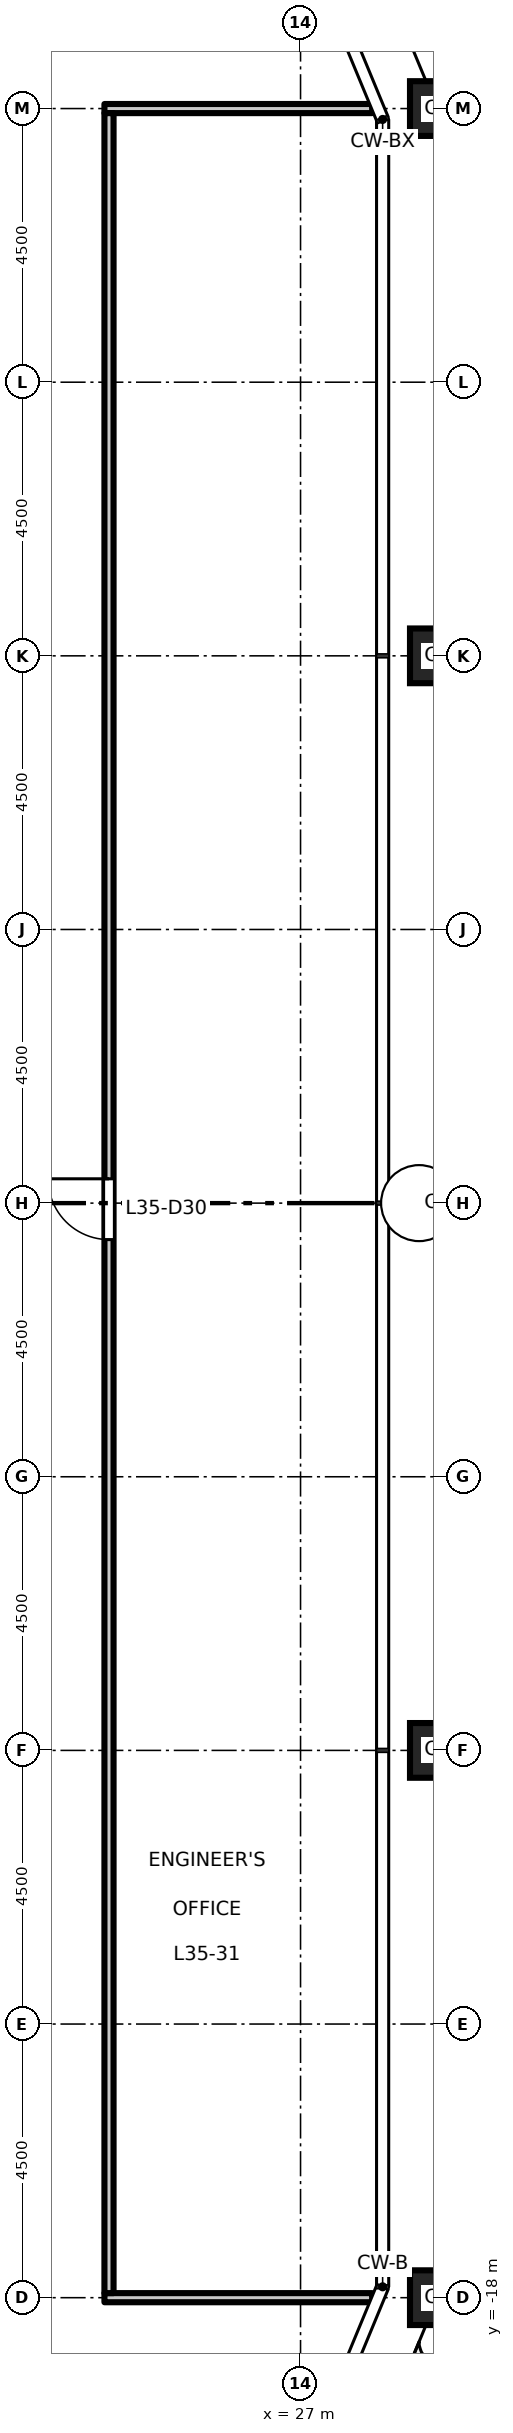
"""IFC4 building model, lengths in metres.
Left out: names, types, materials, properties, quantities, classifications, styles, units other than length and angle.
Written with IfcOpenShell. Run it as: python <this file> out.ifc"""

import sys

from ifc_helpers import new_model, si_unit, direction, frame, frame_2d, origin, origin_2d, place, context, subcontext, project, spatial, rectangle, hollow_rectangle, extrude, element, fill, save


model = new_model("IFC4")
c1 = context("Model", 3, precision=1e-05, world=origin(), true_north=direction((0.0, 1.0)))
c2 = subcontext(c1, "Body", "Model", "MODEL_VIEW")
j1 = project(units=[si_unit("LENGTHUNIT", "METRE"), si_unit("PLANEANGLEUNIT", "RADIAN")], contexts=[c1])
p1 = place(None, origin())
s1 = spatial("IfcSite", under=j1, at=p1, CompositionType="ELEMENT")
p2 = place(p1, origin())
s2 = spatial("IfcBuilding", under=s1, at=p2, CompositionType="ELEMENT")
p3 = place(p2, frame((0.0, 0.0, 163.2)))
s3 = spatial("IfcBuildingStorey", under=s2, at=p3, CompositionType="ELEMENT", Elevation=163.2)
for number, where, z_axis, x_axis in (
    (1, (29.25, -18.0, 0.0), (0.0, 0.0, 1.0), (1.0, 0.0, 0.0)),
    (2, (29.25, -9.0, 0.0), (0.0, 0.0, 1.0), (1.0, 0.0, 0.0)),
    (3, (29.25, 0.0, 0.0), (0.0, 0.0, 1.0), (1.0, 0.0, 0.0)),
    (4, (29.25, 9.0, 0.0), (0.0, 0.0, 1.0), (1.0, 0.0, 0.0)),
    (5, (29.25, 18.0, 0.0), (0.0, 0.0, 1.0), (1.0, 0.0, 0.0)),
):
    element("IfcColumn", number, at=place(p3, frame(where, z_axis=z_axis, x_axis=x_axis)), inside=s3, PredefinedType="COLUMN", context=c2, shape_type="SweptSolid", body=[
        extrude(hollow_rectangle(XDim=0.9, YDim=0.9, WallThickness=0.05, at=origin_2d()), origin(), (0.0, 0.0, 1.0), 4.5),
    ])
for number, where, z_axis, x_axis in (
    (6, (23.775, -18.0, 0.0), (0.0, 0.0, 1.0), (1.0, 0.0, 0.0)),
    (7, (23.775, 18.0, 0.0), (0.0, 0.0, 1.0), (1.0, 0.0, 0.0)),
):
    element("IfcWall", number, at=place(p3, frame(where, z_axis=z_axis, x_axis=x_axis)), inside=s3, PredefinedType="PARTITIONING", context=c2, shape_type="SweptSolid", body=[
        extrude(rectangle(XDim=4.403, YDim=0.15, at=frame_2d((2.202, 0.0))), origin(), (0.0, 0.0, 1.0), 4.35),
    ])
p4 = place(p3, frame((23.85, -17.925, 0.0), z_axis=(0.0, 0.0, 1.0), x_axis=(0.0, 1.0, 0.0)))
e8 = element("IfcWall", 8, at=p4, inside=s3, PredefinedType="PARTITIONING", context=c2, shape_type="SweptSolid", body=[
    extrude(rectangle(XDim=35.85, YDim=0.15, at=frame_2d((17.925, 0.0))), origin(), (0.0, 0.0, 1.0), 4.35),
])
p5 = place(p4, frame((17.325, 0.0, 0.0)))
e9 = element("IfcOpeningElement", 9, at=p5, cuts=e8, PredefinedType="OPENING", context=c2, shape_type="SweptSolid", body=[
    extrude(rectangle(XDim=1.0, YDim=2.1, at=frame_2d((0.5, 1.05))), frame((0.0, 0.085, 0.0), z_axis=(0.0, -1.0, 0.0), x_axis=(1.0, 0.0, 0.0)), (0.0, 0.0, 1.0), 0.17),
])
p6 = place(p5, origin())
e10 = element("IfcDoor", 10, at=p6, inside=s3, OperationType="SINGLE_SWING_RIGHT", PredefinedType="DOOR", context=c2, shape_type="SweptSolid", body=[
    extrude(rectangle(XDim=1.0, YDim=2.1, at=frame_2d((0.5, 1.05))), frame((0.0, 0.025, 0.0), z_axis=(0.0, -1.0, 0.0), x_axis=(1.0, 0.0, 0.0)), (0.0, 0.0, 1.0), 0.05),
])
fill(e9, e10)
save(model, sys.argv[1])
